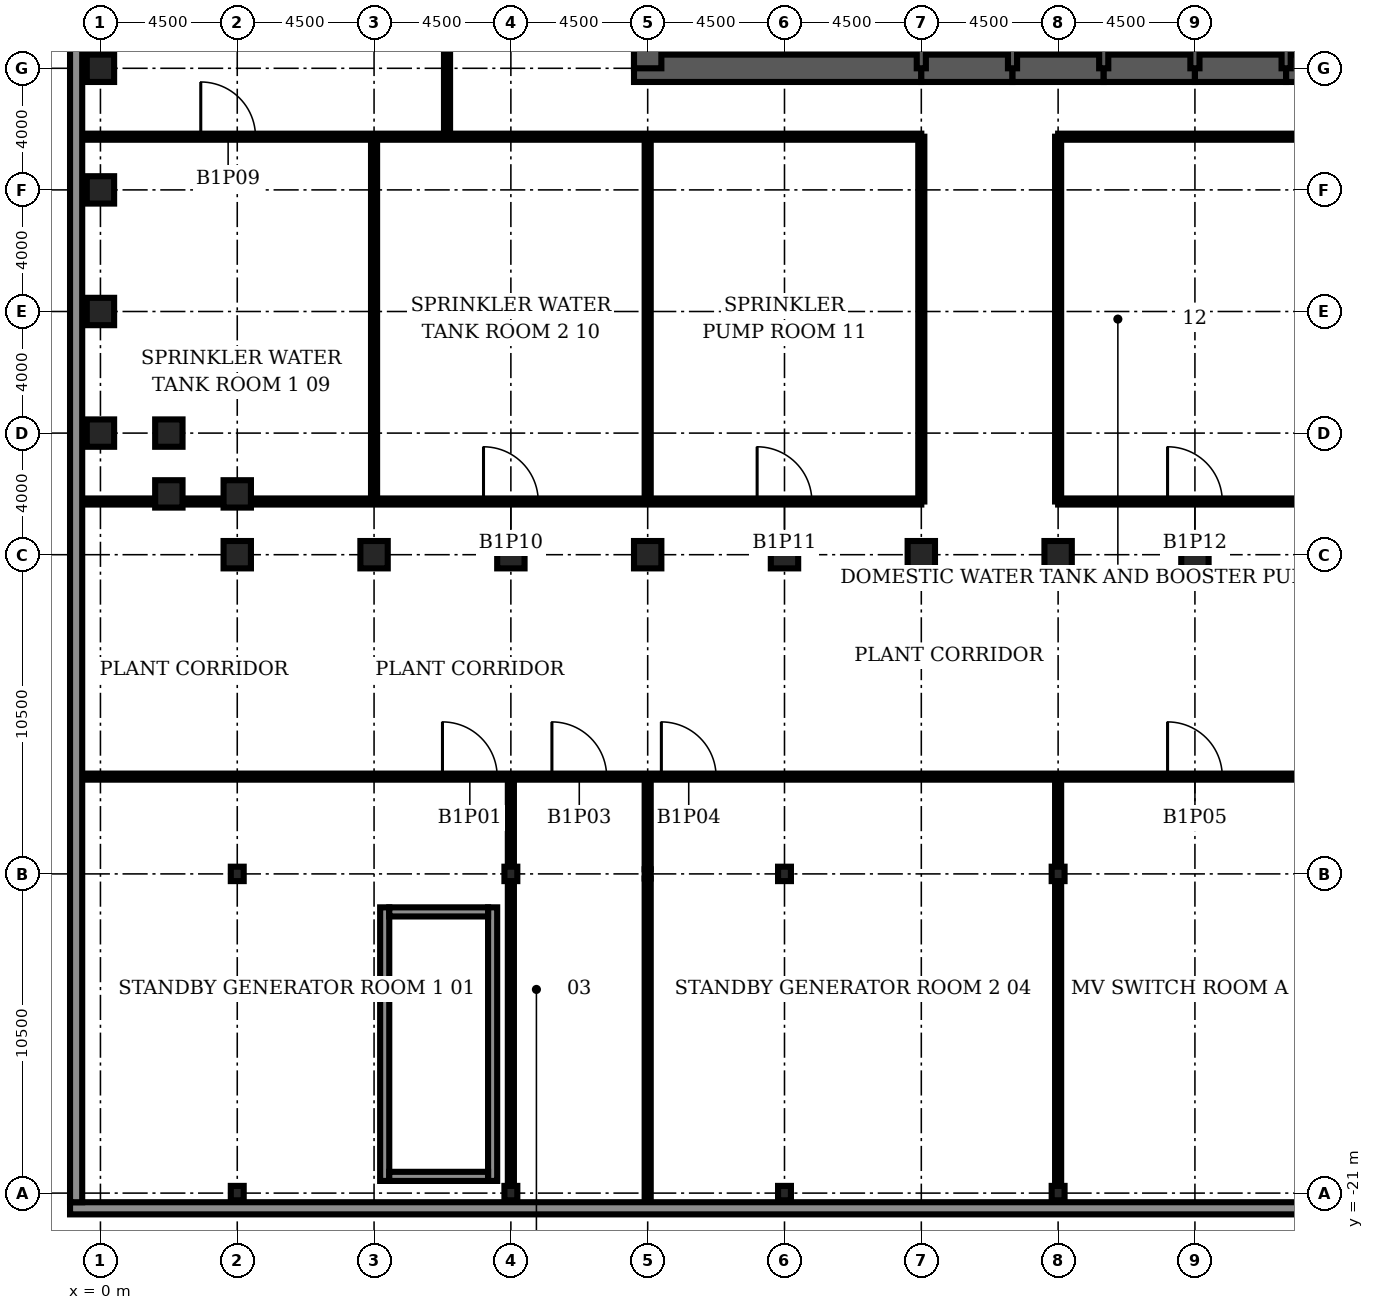
"""IFC4 building model, lengths in metres.
Left out: names, types, materials, properties, quantities, classifications, styles, units other than length and angle.
Written with IfcOpenShell. Run it as: python <this file> out.ifc"""

import sys

from ifc_helpers import new_model, si_unit, direction, frame, frame_2d, origin, origin_2d, place, context, subcontext, project, spatial, rectangle, hollow_rectangle, i_section, extrude, element, fill, save


model = new_model("IFC4")
c1 = context("Model", 3, precision=1e-05, world=origin(), true_north=direction((0.0, 1.0)))
c2 = subcontext(c1, "Body", "Model", "MODEL_VIEW")
j1 = project(units=[si_unit("LENGTHUNIT", "METRE"), si_unit("PLANEANGLEUNIT", "RADIAN")], contexts=[c1])
p1 = place(None, origin())
s1 = spatial("IfcSite", under=j1, at=p1, CompositionType="ELEMENT")
p2 = place(p1, origin())
s2 = spatial("IfcBuilding", under=s1, at=p2, CompositionType="ELEMENT")
p3 = place(p2, frame((0.0, 0.0, -6.0)))
s3 = spatial("IfcBuildingStorey", under=s2, at=p3, CompositionType="ELEMENT", Elevation=-6.0)
for number, where, z_axis, x_axis in (
    (1, (4.5, 0.0, 0.0), (0.0, 0.0, 1.0), (0.0, 1.0, 0.0)),
    (2, (9.0, 0.0, 0.0), (0.0, 0.0, 1.0), (0.0, 1.0, 0.0)),
    (3, (13.5, 0.0, 0.0), (0.0, 0.0, 1.0), (0.0, 1.0, 0.0)),
    (4, (18.0, 0.0, 0.0), (0.0, 0.0, 1.0), (0.0, 1.0, 0.0)),
    (5, (22.5, 0.0, 0.0), (0.0, 0.0, 1.0), (0.0, 1.0, 0.0)),
    (6, (27.0, 0.0, 0.0), (0.0, 0.0, 1.0), (0.0, 1.0, 0.0)),
    (7, (31.5, 0.0, 0.0), (0.0, 0.0, 1.0), (0.0, 1.0, 0.0)),
    (8, (36.0, 0.0, 0.0), (0.0, 0.0, 1.0), (0.0, 1.0, 0.0)),
    (9, (0.0, 16.0, 0.0), (0.0, 0.0, 1.0), (1.0, 0.0, 0.0)),
    (10, (0.0, 12.0, 0.0), (0.0, 0.0, 1.0), (1.0, 0.0, 0.0)),
    (11, (0.0, 8.0, 0.0), (0.0, 0.0, 1.0), (1.0, 0.0, 0.0)),
    (12, (0.0, 4.0, 0.0), (0.0, 0.0, 1.0), (1.0, 0.0, 0.0)),
    (13, (2.25, 4.0, 0.0), (0.0, 0.0, 1.0), (1.0, 0.0, 0.0)),
    (14, (2.25, 2.0, 0.0), (0.0, 0.0, 1.0), (1.0, 0.0, 0.0)),
    (15, (4.5, 2.0, 0.0), (0.0, 0.0, 1.0), (0.0, 1.0, 0.0)),
):
    element("IfcColumn", number, at=place(p3, frame(where, z_axis=z_axis, x_axis=x_axis)), inside=s3, PredefinedType="COLUMN", context=c2, shape_type="SweptSolid", body=[
        extrude(hollow_rectangle(XDim=0.9, YDim=0.9, WallThickness=0.12, at=origin_2d()), origin(), (0.0, 0.0, 1.0), 6.0),
    ])
for number, where, z_axis, x_axis in (
    (16, (4.5, -21.0, 0.0), (0.0, 0.0, 1.0), (1.0, 0.0, 0.0)),
    (17, (4.5, -10.5, 0.0), (0.0, 0.0, 1.0), (1.0, 0.0, 0.0)),
    (18, (13.5, -21.0, 0.0), (0.0, 0.0, 1.0), (1.0, 0.0, 0.0)),
    (19, (13.5, -10.5, 0.0), (0.0, 0.0, 1.0), (1.0, 0.0, 0.0)),
    (20, (22.5, -21.0, 0.0), (0.0, 0.0, 1.0), (1.0, 0.0, 0.0)),
    (21, (22.5, -10.5, 0.0), (0.0, 0.0, 1.0), (1.0, 0.0, 0.0)),
    (22, (31.5, -21.0, 0.0), (0.0, 0.0, 1.0), (1.0, 0.0, 0.0)),
    (23, (31.5, -10.5, 0.0), (0.0, 0.0, 1.0), (1.0, 0.0, 0.0)),
):
    element("IfcColumn", number, at=place(p3, frame(where, z_axis=z_axis, x_axis=x_axis)), inside=s3, PredefinedType="COLUMN", context=c2, shape_type="SweptSolid", body=[
        extrude(i_section(OverallWidth=0.424, OverallDepth=0.474, WebThickness=0.048, FlangeThickness=0.077, at=origin_2d()), origin(), (0.0, 0.0, 1.0), 6.0),
    ])
p4 = place(p3, frame((17.55, 16.0, 0.0), z_axis=(0.0, 0.0, 1.0), x_axis=(1.0, 0.0, 0.0)))
e24 = element("IfcWall", 24, at=p4, inside=s3, PredefinedType="SHEAR", context=c2, shape_type="SweptSolid", body=[
    extrude(rectangle(XDim=9.45, YDim=0.9, at=frame_2d((4.725, 0.0))), origin(), (0.0, 0.0, 1.0), 6.0),
])
for number, where, z_axis, x_axis in (
    (25, (27.0, 16.0, 0.0), (0.0, 0.0, 1.0), (1.0, 0.0, 0.0)),
    (26, (30.0, 16.0, 0.0), (0.0, 0.0, 1.0), (1.0, 0.0, 0.0)),
    (27, (33.0, 16.0, 0.0), (0.0, 0.0, 1.0), (1.0, 0.0, 0.0)),
    (28, (36.0, 16.0, 0.0), (0.0, 0.0, 1.0), (1.0, 0.0, 0.0)),
    (29, (39.0, 16.0, 0.0), (0.0, 0.0, 1.0), (1.0, 0.0, 0.0)),
):
    element("IfcWall", number, at=place(p3, frame(where, z_axis=z_axis, x_axis=x_axis)), inside=s3, PredefinedType="SHEAR", context=c2, shape_type="SweptSolid", body=[
        extrude(rectangle(XDim=3.0, YDim=0.9, at=frame_2d((1.5, 0.0))), origin(), (0.0, 0.0, 1.0), 6.0),
    ])
p5 = place(p3, frame((18.0, 19.2, 0.0), z_axis=(0.0, 0.0, 1.0), x_axis=(0.0, -1.0, 0.0)))
e30 = element("IfcWall", 30, at=p5, inside=s3, PredefinedType="SHEAR", context=c2, shape_type="SweptSolid", body=[
    extrude(rectangle(XDim=3.2, YDim=0.9, at=frame_2d((1.6, 0.0))), origin(), (0.0, 0.0, 1.0), 6.0),
])
for number, where, z_axis, x_axis in (
    (31, (27.0, 16.0, 0.0), (0.0, 0.0, 1.0), (0.0, 1.0, 0.0)),
    (32, (30.0, 16.0, 0.0), (0.0, 0.0, 1.0), (0.0, 1.0, 0.0)),
    (33, (33.0, 16.0, 0.0), (0.0, 0.0, 1.0), (0.0, 1.0, 0.0)),
    (34, (36.0, 16.0, 0.0), (0.0, 0.0, 1.0), (0.0, 1.0, 0.0)),
    (35, (39.0, 16.0, 0.0), (0.0, 0.0, 1.0), (0.0, 1.0, 0.0)),
):
    element("IfcWall", number, at=place(p3, frame(where, z_axis=z_axis, x_axis=x_axis)), inside=s3, PredefinedType="SOLIDWALL", context=c2, shape_type="SweptSolid", body=[
        extrude(rectangle(XDim=3.2, YDim=0.3, at=frame_2d((1.6, 0.0))), origin(), (0.0, 0.0, 1.0), 6.0),
    ])
p6 = place(p3, frame((-0.59, -7.3, 0.0), z_axis=(0.0, 0.0, 1.0), x_axis=(1.0, 0.0, 0.0)))
e36 = element("IfcWall", 36, at=p6, inside=s3, PredefinedType="PARTITIONING", context=c2, shape_type="SweptSolid", body=[
    extrude(rectangle(XDim=73.18, YDim=0.2, at=frame_2d((36.59, 0.0))), origin(), (0.0, 0.0, 1.0), 5.7),
])
p7 = place(p6, frame((11.84, 0.0, 0.0)))
e37 = element("IfcOpeningElement", 37, at=p7, cuts=e36, PredefinedType="OPENING", context=c2, shape_type="SweptSolid", body=[
    extrude(rectangle(XDim=1.8, YDim=2.1, at=frame_2d((0.9, 1.05))), frame((0.0, 0.11, 0.0), z_axis=(0.0, -1.0, 0.0), x_axis=(1.0, 0.0, 0.0)), (0.0, 0.0, 1.0), 0.22),
])
p8 = place(p6, frame((64.04, 0.0, 0.0)))
e38 = element("IfcOpeningElement", 38, at=p8, cuts=e36, PredefinedType="OPENING", context=c2, shape_type="SweptSolid", body=[
    extrude(rectangle(XDim=1.8, YDim=2.1, at=frame_2d((0.9, 1.05))), frame((0.0, 0.11, 0.0), z_axis=(0.0, -1.0, 0.0), x_axis=(1.0, 0.0, 0.0)), (0.0, 0.0, 1.0), 0.22),
])
p9 = place(p6, frame((15.44, 0.0, 0.0)))
e39 = element("IfcOpeningElement", 39, at=p9, cuts=e36, PredefinedType="OPENING", context=c2, shape_type="SweptSolid", body=[
    extrude(rectangle(XDim=1.8, YDim=2.1, at=frame_2d((0.9, 1.05))), frame((0.0, 0.11, 0.0), z_axis=(0.0, -1.0, 0.0), x_axis=(1.0, 0.0, 0.0)), (0.0, 0.0, 1.0), 0.22),
])
p10 = place(p6, frame((19.04, 0.0, 0.0)))
e40 = element("IfcOpeningElement", 40, at=p10, cuts=e36, PredefinedType="OPENING", context=c2, shape_type="SweptSolid", body=[
    extrude(rectangle(XDim=1.8, YDim=2.1, at=frame_2d((0.9, 1.05))), frame((0.0, 0.11, 0.0), z_axis=(0.0, -1.0, 0.0), x_axis=(1.0, 0.0, 0.0)), (0.0, 0.0, 1.0), 0.22),
])
p11 = place(p6, frame((35.69, 0.0, 0.0)))
e41 = element("IfcOpeningElement", 41, at=p11, cuts=e36, PredefinedType="OPENING", context=c2, shape_type="SweptSolid", body=[
    extrude(rectangle(XDim=1.8, YDim=2.1, at=frame_2d((0.9, 1.05))), frame((0.0, 0.11, 0.0), z_axis=(0.0, -1.0, 0.0), x_axis=(1.0, 0.0, 0.0)), (0.0, 0.0, 1.0), 0.22),
])
p12 = place(p6, frame((44.69, 0.0, 0.0)))
e42 = element("IfcOpeningElement", 42, at=p12, cuts=e36, PredefinedType="OPENING", context=c2, shape_type="SweptSolid", body=[
    extrude(rectangle(XDim=1.8, YDim=2.1, at=frame_2d((0.9, 1.05))), frame((0.0, 0.11, 0.0), z_axis=(0.0, -1.0, 0.0), x_axis=(1.0, 0.0, 0.0)), (0.0, 0.0, 1.0), 0.22),
])
p13 = place(p6, frame((52.565, 0.0, 0.0)))
e43 = element("IfcOpeningElement", 43, at=p13, cuts=e36, PredefinedType="OPENING", context=c2, shape_type="SweptSolid", body=[
    extrude(rectangle(XDim=1.8, YDim=2.1, at=frame_2d((0.9, 1.05))), frame((0.0, 0.11, 0.0), z_axis=(0.0, -1.0, 0.0), x_axis=(1.0, 0.0, 0.0)), (0.0, 0.0, 1.0), 0.22),
])
p14 = place(p6, frame((59.315, 0.0, 0.0)))
e44 = element("IfcOpeningElement", 44, at=p14, cuts=e36, PredefinedType="OPENING", context=c2, shape_type="SweptSolid", body=[
    extrude(rectangle(XDim=1.8, YDim=2.1, at=frame_2d((0.9, 1.05))), frame((0.0, 0.11, 0.0), z_axis=(0.0, -1.0, 0.0), x_axis=(1.0, 0.0, 0.0)), (0.0, 0.0, 1.0), 0.22),
])
p15 = place(p3, frame((-0.59, 1.75, 0.0), z_axis=(0.0, 0.0, 1.0), x_axis=(1.0, 0.0, 0.0)))
e45 = element("IfcWall", 45, at=p15, inside=s3, PredefinedType="PARTITIONING", context=c2, shape_type="SweptSolid", body=[
    extrude(rectangle(XDim=27.59, YDim=0.2, at=frame_2d((13.795, 0.0))), origin(), (0.0, 0.0, 1.0), 5.7),
])
p16 = place(p15, frame((13.19, 0.0, 0.0)))
e46 = element("IfcOpeningElement", 46, at=p16, cuts=e45, PredefinedType="OPENING", context=c2, shape_type="SweptSolid", body=[
    extrude(rectangle(XDim=1.8, YDim=2.1, at=frame_2d((0.9, 1.05))), frame((0.0, 0.11, 0.0), z_axis=(0.0, -1.0, 0.0), x_axis=(1.0, 0.0, 0.0)), (0.0, 0.0, 1.0), 0.22),
])
p17 = place(p15, frame((22.19, 0.0, 0.0)))
e47 = element("IfcOpeningElement", 47, at=p17, cuts=e45, PredefinedType="OPENING", context=c2, shape_type="SweptSolid", body=[
    extrude(rectangle(XDim=1.8, YDim=2.1, at=frame_2d((0.9, 1.05))), frame((0.0, 0.11, 0.0), z_axis=(0.0, -1.0, 0.0), x_axis=(1.0, 0.0, 0.0)), (0.0, 0.0, 1.0), 0.22),
])
p18 = place(p3, frame((31.5, 1.75, 0.0), z_axis=(0.0, 0.0, 1.0), x_axis=(1.0, 0.0, 0.0)))
e48 = element("IfcWall", 48, at=p18, inside=s3, PredefinedType="PARTITIONING", context=c2, shape_type="SweptSolid", body=[
    extrude(rectangle(XDim=13.5, YDim=0.2, at=frame_2d((6.75, 0.0))), origin(), (0.0, 0.0, 1.0), 5.7),
])
p19 = place(p18, frame((3.6, 0.0, 0.0)))
e49 = element("IfcOpeningElement", 49, at=p19, cuts=e48, PredefinedType="OPENING", context=c2, shape_type="SweptSolid", body=[
    extrude(rectangle(XDim=1.8, YDim=2.1, at=frame_2d((0.9, 1.05))), frame((0.0, 0.11, 0.0), z_axis=(0.0, -1.0, 0.0), x_axis=(1.0, 0.0, 0.0)), (0.0, 0.0, 1.0), 0.22),
])
p20 = place(p18, frame((10.75, 0.0, 0.0)))
e50 = element("IfcOpeningElement", 50, at=p20, cuts=e48, PredefinedType="OPENING", context=c2, shape_type="SweptSolid", body=[
    extrude(rectangle(XDim=1.0, YDim=2.1, at=frame_2d((0.5, 1.05))), frame((0.0, 0.11, 0.0), z_axis=(0.0, -1.0, 0.0), x_axis=(1.0, 0.0, 0.0)), (0.0, 0.0, 1.0), 0.22),
])
p21 = place(p3, frame((-0.59, 13.75, 0.0), z_axis=(0.0, 0.0, 1.0), x_axis=(1.0, 0.0, 0.0)))
e51 = element("IfcWall", 51, at=p21, inside=s3, PredefinedType="PARTITIONING", context=c2, shape_type="SweptSolid", body=[
    extrude(rectangle(XDim=27.59, YDim=0.2, at=frame_2d((13.795, 0.0))), origin(), (0.0, 0.0, 1.0), 5.7),
])
p22 = place(p21, frame((3.89, 0.0, 0.0)))
e52 = element("IfcOpeningElement", 52, at=p22, cuts=e51, PredefinedType="OPENING", context=c2, shape_type="SweptSolid", body=[
    extrude(rectangle(XDim=1.8, YDim=2.1, at=frame_2d((0.9, 1.05))), frame((0.0, 0.11, 0.0), z_axis=(0.0, -1.0, 0.0), x_axis=(1.0, 0.0, 0.0)), (0.0, 0.0, 1.0), 0.22),
])
p23 = place(p3, frame((31.5, 13.75, 0.0), z_axis=(0.0, 0.0, 1.0), x_axis=(1.0, 0.0, 0.0)))
e53 = element("IfcWall", 53, at=p23, inside=s3, PredefinedType="PARTITIONING", context=c2, shape_type="SweptSolid", body=[
    extrude(rectangle(XDim=13.5, YDim=0.2, at=frame_2d((6.75, 0.0))), origin(), (0.0, 0.0, 1.0), 5.7),
])
p24 = place(p3, frame((9.0, 1.75, 0.0), z_axis=(0.0, 0.0, 1.0), x_axis=(0.0, 1.0, 0.0)))
e54 = element("IfcWall", 54, at=p24, inside=s3, PredefinedType="PARTITIONING", context=c2, shape_type="SweptSolid", body=[
    extrude(rectangle(XDim=12.0, YDim=0.2, at=frame_2d((6.0, 0.0))), origin(), (0.0, 0.0, 1.0), 5.7),
])
p25 = place(p3, frame((11.4, 13.75, 0.0), z_axis=(0.0, 0.0, 1.0), x_axis=(0.0, 1.0, 0.0)))
e55 = element("IfcWall", 55, at=p25, inside=s3, PredefinedType="PARTITIONING", context=c2, shape_type="SweptSolid", body=[
    extrude(rectangle(XDim=32.84, YDim=0.2, at=frame_2d((16.42, 0.0))), origin(), (0.0, 0.0, 1.0), 5.7),
])
p26 = place(p25, frame((15.525, 0.0, 0.0)))
e56 = element("IfcOpeningElement", 56, at=p26, cuts=e55, PredefinedType="OPENING", context=c2, shape_type="SweptSolid", body=[
    extrude(rectangle(XDim=1.8, YDim=2.1, at=frame_2d((0.9, 1.05))), frame((0.0, 0.11, 0.0), z_axis=(0.0, -1.0, 0.0), x_axis=(1.0, 0.0, 0.0)), (0.0, 0.0, 1.0), 0.22),
])
p27 = place(p3, frame((13.5, -21.29, 0.0), z_axis=(0.0, 0.0, 1.0), x_axis=(0.0, 1.0, 0.0)))
e57 = element("IfcWall", 57, at=p27, inside=s3, PredefinedType="PARTITIONING", context=c2, shape_type="SweptSolid", body=[
    extrude(rectangle(XDim=13.99, YDim=0.2, at=frame_2d((6.995, 0.0))), origin(), (0.0, 0.0, 1.0), 4.984),
])
p28 = place(p3, frame((18.0, -21.29, 0.0), z_axis=(0.0, 0.0, 1.0), x_axis=(0.0, 1.0, 0.0)))
e58 = element("IfcWall", 58, at=p28, inside=s3, PredefinedType="PARTITIONING", context=c2, shape_type="SweptSolid", body=[
    extrude(rectangle(XDim=10.638, YDim=0.2, at=frame_2d((5.319, 0.0))), origin(), (0.0, 0.0, 1.0), 5.2),
])
p29 = place(p3, frame((18.0, -10.652, 0.0), z_axis=(0.0, 0.0, 1.0), x_axis=(0.0, 1.0, 0.0)))
e59 = element("IfcWall", 59, at=p29, inside=s3, PredefinedType="PARTITIONING", context=c2, shape_type="SweptSolid", body=[
    extrude(rectangle(XDim=0.304, YDim=0.2, at=frame_2d((0.152, 0.0))), origin(), (0.0, 0.0, 1.0), 5.7),
])
p30 = place(p3, frame((18.0, -10.348, 0.0), z_axis=(0.0, 0.0, 1.0), x_axis=(0.0, 1.0, 0.0)))
e60 = element("IfcWall", 60, at=p30, inside=s3, PredefinedType="PARTITIONING", context=c2, shape_type="SweptSolid", body=[
    extrude(rectangle(XDim=3.048, YDim=0.2, at=frame_2d((1.524, 0.0))), origin(), (0.0, 0.0, 1.0), 5.2),
])
for number, where, z_axis, x_axis in (
    (61, (18.0, 1.75, 0.0), (0.0, 0.0, 1.0), (0.0, 1.0, 0.0)),
    (62, (27.0, 1.75, 0.0), (0.0, 0.0, 1.0), (0.0, 1.0, 0.0)),
):
    element("IfcWall", number, at=place(p3, frame(where, z_axis=z_axis, x_axis=x_axis)), inside=s3, PredefinedType="PARTITIONING", context=c2, shape_type="SweptSolid", body=[
        extrude(rectangle(XDim=12.0, YDim=0.2, at=frame_2d((6.0, 0.0))), origin(), (0.0, 0.0, 1.0), 5.7),
    ])
p31 = place(p3, frame((31.5, -21.29, 0.0), z_axis=(0.0, 0.0, 1.0), x_axis=(0.0, 1.0, 0.0)))
e63 = element("IfcWall", 63, at=p31, inside=s3, PredefinedType="PARTITIONING", context=c2, shape_type="SweptSolid", body=[
    extrude(rectangle(XDim=13.99, YDim=0.2, at=frame_2d((6.995, 0.0))), origin(), (0.0, 0.0, 1.0), 4.984),
])
p32 = place(p3, frame((31.5, 1.75, 0.0), z_axis=(0.0, 0.0, 1.0), x_axis=(0.0, 1.0, 0.0)))
e64 = element("IfcWall", 64, at=p32, inside=s3, PredefinedType="PARTITIONING", context=c2, shape_type="SweptSolid", body=[
    extrude(rectangle(XDim=12.0, YDim=0.2, at=frame_2d((6.0, 0.0))), origin(), (0.0, 0.0, 1.0), 5.7),
])
p33 = place(p3, frame((-1.0, -21.5, 0.0), z_axis=(0.0, 0.0, 1.0), x_axis=(1.0, 0.0, 0.0)))
e65 = element("IfcWall", 65, at=p33, inside=s3, PredefinedType="SOLIDWALL", context=c2, shape_type="SweptSolid", body=[
    extrude(rectangle(XDim=74.0, YDim=0.4, at=frame_2d((37.0, 0.0))), origin(), (0.0, 0.0, 1.0), 5.7),
])
p34 = place(p3, frame((-0.8, 46.6, 0.0), z_axis=(0.0, 0.0, 1.0), x_axis=(0.0, -1.0, 0.0)))
e66 = element("IfcWall", 66, at=p34, inside=s3, PredefinedType="SOLIDWALL", context=c2, shape_type="SweptSolid", body=[
    extrude(rectangle(XDim=67.9, YDim=0.4, at=frame_2d((33.95, 0.0))), origin(), (0.0, 0.0, 1.0), 5.7),
])
for number, where, z_axis, x_axis in (
    (67, (9.35, -20.6, 0.0), (0.0, 0.0, 1.0), (0.0, 1.0, 0.0)),
    (68, (12.9, -20.6, 0.0), (0.0, 0.0, 1.0), (0.0, 1.0, 0.0)),
):
    element("IfcWall", number, at=place(p3, frame(where, z_axis=z_axis, x_axis=x_axis)), inside=s3, PredefinedType="SOLIDWALL", context=c2, shape_type="SweptSolid", body=[
        extrude(rectangle(XDim=9.0, YDim=0.3, at=frame_2d((4.5, 0.0))), origin(), (0.0, 0.0, 1.0), 5.7),
    ])
for number, where, z_axis, x_axis in (
    (69, (9.5, -20.45, 0.0), (0.0, 0.0, 1.0), (1.0, 0.0, 0.0)),
    (70, (9.5, -11.75, 0.0), (0.0, 0.0, 1.0), (1.0, 0.0, 0.0)),
):
    element("IfcWall", number, at=place(p3, frame(where, z_axis=z_axis, x_axis=x_axis)), inside=s3, PredefinedType="SOLIDWALL", context=c2, shape_type="SweptSolid", body=[
        extrude(rectangle(XDim=3.25, YDim=0.3, at=frame_2d((1.625, 0.0))), origin(), (0.0, 0.0, 1.0), 5.7),
    ])
p35 = place(p7, origin())
e71 = element("IfcDoor", 71, at=p35, inside=s3, OperationType="SINGLE_SWING_LEFT", PredefinedType="DOOR", context=c2, shape_type="SweptSolid", body=[
    extrude(rectangle(XDim=1.8, YDim=2.1, at=frame_2d((0.9, 1.05))), frame((0.0, 0.025, 0.0), z_axis=(0.0, -1.0, 0.0), x_axis=(1.0, 0.0, 0.0)), (0.0, 0.0, 1.0), 0.05),
])
fill(e37, e71)
p36 = place(p9, origin())
e72 = element("IfcDoor", 72, at=p36, inside=s3, OperationType="SINGLE_SWING_LEFT", PredefinedType="DOOR", context=c2, shape_type="SweptSolid", body=[
    extrude(rectangle(XDim=1.8, YDim=2.1, at=frame_2d((0.9, 1.05))), frame((0.0, 0.025, 0.0), z_axis=(0.0, -1.0, 0.0), x_axis=(1.0, 0.0, 0.0)), (0.0, 0.0, 1.0), 0.05),
])
fill(e39, e72)
p37 = place(p10, origin())
e73 = element("IfcDoor", 73, at=p37, inside=s3, OperationType="SINGLE_SWING_LEFT", PredefinedType="DOOR", context=c2, shape_type="SweptSolid", body=[
    extrude(rectangle(XDim=1.8, YDim=2.1, at=frame_2d((0.9, 1.05))), frame((0.0, 0.025, 0.0), z_axis=(0.0, -1.0, 0.0), x_axis=(1.0, 0.0, 0.0)), (0.0, 0.0, 1.0), 0.05),
])
fill(e40, e73)
p38 = place(p11, origin())
e74 = element("IfcDoor", 74, at=p38, inside=s3, OperationType="SINGLE_SWING_LEFT", PredefinedType="DOOR", context=c2, shape_type="SweptSolid", body=[
    extrude(rectangle(XDim=1.8, YDim=2.1, at=frame_2d((0.9, 1.05))), frame((0.0, 0.025, 0.0), z_axis=(0.0, -1.0, 0.0), x_axis=(1.0, 0.0, 0.0)), (0.0, 0.0, 1.0), 0.05),
])
fill(e41, e74)
p39 = place(p22, origin())
e75 = element("IfcDoor", 75, at=p39, inside=s3, OperationType="SINGLE_SWING_LEFT", PredefinedType="DOOR", context=c2, shape_type="SweptSolid", body=[
    extrude(rectangle(XDim=1.8, YDim=2.1, at=frame_2d((0.9, 1.05))), frame((0.0, 0.025, 0.0), z_axis=(0.0, -1.0, 0.0), x_axis=(1.0, 0.0, 0.0)), (0.0, 0.0, 1.0), 0.05),
])
fill(e52, e75)
p40 = place(p16, origin())
e76 = element("IfcDoor", 76, at=p40, inside=s3, OperationType="SINGLE_SWING_LEFT", PredefinedType="DOOR", context=c2, shape_type="SweptSolid", body=[
    extrude(rectangle(XDim=1.8, YDim=2.1, at=frame_2d((0.9, 1.05))), frame((0.0, 0.025, 0.0), z_axis=(0.0, -1.0, 0.0), x_axis=(1.0, 0.0, 0.0)), (0.0, 0.0, 1.0), 0.05),
])
fill(e46, e76)
p41 = place(p17, origin())
e77 = element("IfcDoor", 77, at=p41, inside=s3, OperationType="SINGLE_SWING_LEFT", PredefinedType="DOOR", context=c2, shape_type="SweptSolid", body=[
    extrude(rectangle(XDim=1.8, YDim=2.1, at=frame_2d((0.9, 1.05))), frame((0.0, 0.025, 0.0), z_axis=(0.0, -1.0, 0.0), x_axis=(1.0, 0.0, 0.0)), (0.0, 0.0, 1.0), 0.05),
])
fill(e47, e77)
p42 = place(p19, origin())
e78 = element("IfcDoor", 78, at=p42, inside=s3, OperationType="SINGLE_SWING_LEFT", PredefinedType="DOOR", context=c2, shape_type="SweptSolid", body=[
    extrude(rectangle(XDim=1.8, YDim=2.1, at=frame_2d((0.9, 1.05))), frame((0.0, 0.025, 0.0), z_axis=(0.0, -1.0, 0.0), x_axis=(1.0, 0.0, 0.0)), (0.0, 0.0, 1.0), 0.05),
])
fill(e49, e78)
save(model, sys.argv[1])
